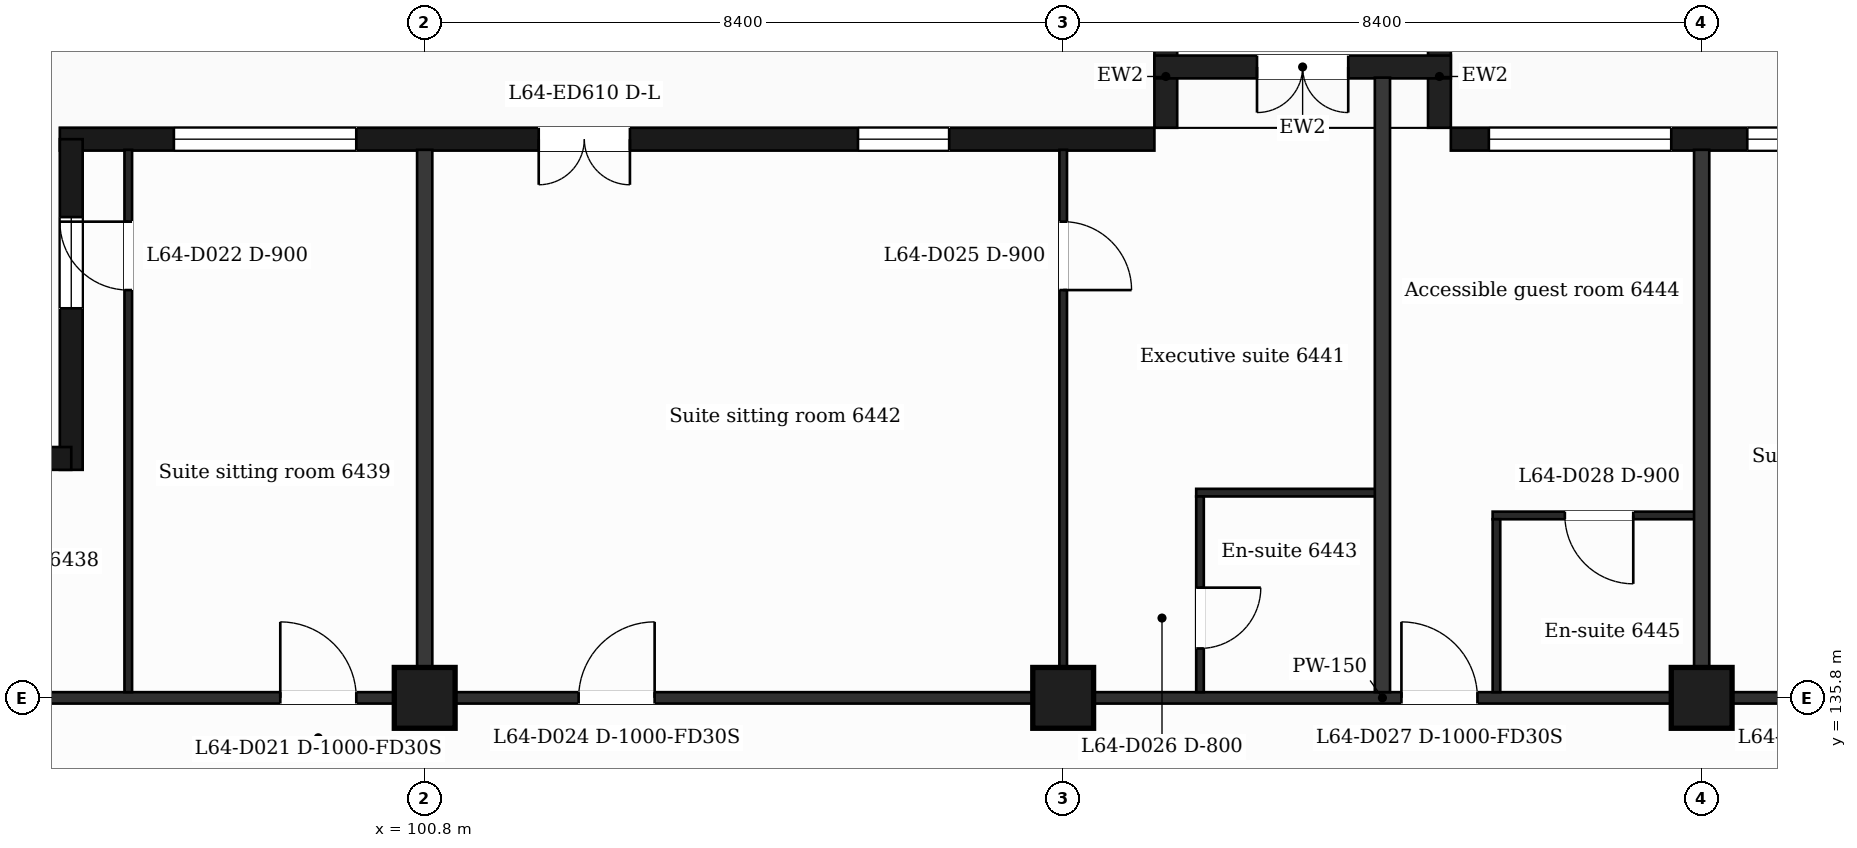
"""IFC4 building model, lengths in metres.
Left out: names, types, materials, properties, quantities, classifications, styles, units other than length and angle.
Written with IfcOpenShell. Run it as: python <this file> out.ifc"""

import sys

from ifc_helpers import new_model, si_unit, direction, frame, frame_2d, origin, origin_2d, place, context, subcontext, project, spatial, rectangle, extrude, element, fill, save


model = new_model("IFC4")
c1 = context("Model", 3, precision=1e-05, world=origin(), true_north=direction((0.0, 1.0)))
c2 = subcontext(c1, "Body", "Model", "MODEL_VIEW")
j1 = project(units=[si_unit("LENGTHUNIT", "METRE"), si_unit("PLANEANGLEUNIT", "RADIAN")], contexts=[c1])
p1 = place(None, origin())
s1 = spatial("IfcSite", under=j1, at=p1, CompositionType="ELEMENT")
p2 = place(p1, origin())
s2 = spatial("IfcBuilding", under=s1, at=p2, CompositionType="ELEMENT")
p3 = place(p2, frame((0.0, 0.0, 266.4)))
s3 = spatial("IfcBuildingStorey", under=s2, at=p3, CompositionType="ELEMENT", Elevation=266.4)
for number, where, z_axis, x_axis in (
    (1, (100.8, 135.8, 0.0), (0.0, 0.0, 1.0), (1.0, 0.0, 0.0)),
    (2, (109.2, 135.8, 0.0), (0.0, 0.0, 1.0), (1.0, 0.0, 0.0)),
    (3, (117.6, 135.8, 0.0), (0.0, 0.0, 1.0), (1.0, 0.0, 0.0)),
):
    element("IfcColumn", number, at=place(p3, frame(where, z_axis=z_axis, x_axis=x_axis)), inside=s3, PredefinedType="COLUMN", context=c2, shape_type="SweptSolid", body=[
        extrude(rectangle(XDim=0.8, YDim=0.8, at=origin_2d()), origin(), (0.0, 0.0, 1.0), 3.7),
    ])
p4 = place(p3, frame((130.65, 143.15, 0.0), z_axis=(0.0, 0.0, 1.0), x_axis=(-1.0, 0.0, 0.0)))
e4 = element("IfcWall", 4, at=p4, inside=s3, PredefinedType="SOLIDWALL", context=c2, shape_type="SweptSolid", body=[
    extrude(rectangle(XDim=16.35, YDim=0.3, at=frame_2d((8.175, 0.0))), origin(), (0.0, 0.0, 1.0), 3.38),
])
p5 = place(p4, frame((1.35, 0.0, 0.9)))
e5 = element("IfcOpeningElement", 5, at=p5, cuts=e4, PredefinedType="OPENING", context=c2, shape_type="SweptSolid", body=[
    extrude(rectangle(XDim=2.4, YDim=2.1, at=frame_2d((1.2, 1.05))), frame((0.0, 0.16, 0.0), z_axis=(0.0, -1.0, 0.0), x_axis=(1.0, 0.0, 0.0)), (0.0, 0.0, 1.0), 0.32),
])
p6 = place(p4, frame((5.55, 0.0, 0.9)))
e6 = element("IfcOpeningElement", 6, at=p6, cuts=e4, PredefinedType="OPENING", context=c2, shape_type="SweptSolid", body=[
    extrude(rectangle(XDim=2.4, YDim=2.1, at=frame_2d((1.2, 1.05))), frame((0.0, 0.16, 0.0), z_axis=(0.0, -1.0, 0.0), x_axis=(1.0, 0.0, 0.0)), (0.0, 0.0, 1.0), 0.32),
])
p7 = place(p4, frame((9.45, 0.0, 0.0)))
e7 = element("IfcOpeningElement", 7, at=p7, cuts=e4, PredefinedType="OPENING", context=c2, shape_type="SweptSolid", body=[
    extrude(rectangle(XDim=1.2, YDim=2.4, at=frame_2d((0.6, 1.2))), frame((0.0, 0.16, 0.0), z_axis=(0.0, -1.0, 0.0), x_axis=(1.0, 0.0, 0.0)), (0.0, 0.0, 1.0), 0.32),
])
p8 = place(p4, frame((11.25, 0.0, 0.9)))
e8 = element("IfcOpeningElement", 8, at=p8, cuts=e4, PredefinedType="OPENING", context=c2, shape_type="SweptSolid", body=[
    extrude(rectangle(XDim=1.2, YDim=2.1, at=frame_2d((0.6, 1.05))), frame((0.0, 0.16, 0.0), z_axis=(0.0, -1.0, 0.0), x_axis=(1.0, 0.0, 0.0)), (0.0, 0.0, 1.0), 0.32),
])
p9 = place(p4, frame((13.45, 0.0, 0.9)))
e9 = element("IfcOpeningElement", 9, at=p9, cuts=e4, PredefinedType="OPENING", context=c2, shape_type="SweptSolid", body=[
    extrude(rectangle(XDim=2.4, YDim=2.1, at=frame_2d((1.2, 1.05))), frame((0.0, 0.16, 0.0), z_axis=(0.0, -1.0, 0.0), x_axis=(1.0, 0.0, 0.0)), (0.0, 0.0, 1.0), 0.32),
])
p10 = place(p3, frame((110.4, 143.15, 0.0), z_axis=(0.0, 0.0, 1.0), x_axis=(-1.0, 0.0, 0.0)))
e10 = element("IfcWall", 10, at=p10, inside=s3, PredefinedType="SOLIDWALL", context=c2, shape_type="SweptSolid", body=[
    extrude(rectangle(XDim=14.4, YDim=0.3, at=frame_2d((7.2, 0.0))), origin(), (0.0, 0.0, 1.0), 3.38),
])
p11 = place(p10, frame((2.7, 0.0, 0.9)))
e11 = element("IfcOpeningElement", 11, at=p11, cuts=e10, PredefinedType="OPENING", context=c2, shape_type="SweptSolid", body=[
    extrude(rectangle(XDim=1.2, YDim=2.1, at=frame_2d((0.6, 1.05))), frame((0.0, 0.16, 0.0), z_axis=(0.0, -1.0, 0.0), x_axis=(1.0, 0.0, 0.0)), (0.0, 0.0, 1.0), 0.32),
])
p12 = place(p10, frame((6.9, 0.0, 0.0)))
e12 = element("IfcOpeningElement", 12, at=p12, cuts=e10, PredefinedType="OPENING", context=c2, shape_type="SweptSolid", body=[
    extrude(rectangle(XDim=1.2, YDim=2.4, at=frame_2d((0.6, 1.2))), frame((0.0, 0.16, 0.0), z_axis=(0.0, -1.0, 0.0), x_axis=(1.0, 0.0, 0.0)), (0.0, 0.0, 1.0), 0.32),
])
p13 = place(p10, frame((10.5, 0.0, 0.9)))
e13 = element("IfcOpeningElement", 13, at=p13, cuts=e10, PredefinedType="OPENING", context=c2, shape_type="SweptSolid", body=[
    extrude(rectangle(XDim=2.4, YDim=2.1, at=frame_2d((1.2, 1.05))), frame((0.0, 0.16, 0.0), z_axis=(0.0, -1.0, 0.0), x_axis=(1.0, 0.0, 0.0)), (0.0, 0.0, 1.0), 0.32),
])
for number, where, z_axis, x_axis in (
    (14, (114.15, 143.3, 0.0), (0.0, 0.0, 1.0), (0.0, 1.0, 0.0)),
    (15, (110.55, 143.3, 0.0), (0.0, 0.0, 1.0), (0.0, 1.0, 0.0)),
):
    element("IfcWall", number, at=place(p3, frame(where, z_axis=z_axis, x_axis=x_axis)), inside=s3, PredefinedType="SOLIDWALL", context=c2, shape_type="SweptSolid", body=[
        extrude(rectangle(XDim=1.35, YDim=0.3, at=frame_2d((0.675, 0.0))), origin(), (0.0, 0.0, 1.0), 3.38),
    ])
p14 = place(p3, frame((114.3, 144.1, 0.0), z_axis=(0.0, 0.0, 1.0), x_axis=(-1.0, 0.0, 0.0)))
e16 = element("IfcWall", 16, at=p14, inside=s3, PredefinedType="SOLIDWALL", context=c2, shape_type="SweptSolid", body=[
    extrude(rectangle(XDim=3.9, YDim=0.3, at=frame_2d((1.95, 0.0))), origin(), (0.0, 0.0, 1.0), 3.38),
])
p15 = place(p14, frame((1.35, 0.0, 0.0)))
e17 = element("IfcOpeningElement", 17, at=p15, cuts=e16, PredefinedType="OPENING", context=c2, shape_type="SweptSolid", body=[
    extrude(rectangle(XDim=1.2, YDim=2.4, at=frame_2d((0.6, 1.2))), frame((0.0, 0.16, 0.0), z_axis=(0.0, -1.0, 0.0), x_axis=(1.0, 0.0, 0.0)), (0.0, 0.0, 1.0), 0.32),
])
p16 = place(p3, frame((96.15, 143.15, 0.0), z_axis=(0.0, 0.0, 1.0), x_axis=(0.0, -1.0, 0.0)))
e18 = element("IfcWall", 18, at=p16, inside=s3, PredefinedType="SOLIDWALL", context=c2, shape_type="SweptSolid", body=[
    extrude(rectangle(XDim=4.35, YDim=0.3, at=frame_2d((2.175, 0.0))), origin(), (0.0, 0.0, 1.0), 3.38),
])
p17 = place(p16, frame((1.025, 0.0, 0.9)))
e19 = element("IfcOpeningElement", 19, at=p17, cuts=e18, PredefinedType="OPENING", context=c2, shape_type="SweptSolid", body=[
    extrude(rectangle(XDim=1.2, YDim=2.1, at=frame_2d((0.6, 1.05))), frame((0.0, 0.16, 0.0), z_axis=(0.0, -1.0, 0.0), x_axis=(1.0, 0.0, 0.0)), (0.0, 0.0, 1.0), 0.32),
])
p18 = place(p3, frame((96.15, 138.95, 0.0), z_axis=(0.0, 0.0, 1.0), x_axis=(-1.0, 0.0, 0.0)))
e20 = element("IfcWall", 20, at=p18, inside=s3, PredefinedType="SOLIDWALL", context=c2, shape_type="SweptSolid", body=[
    extrude(rectangle(XDim=5.104, YDim=0.3, at=frame_2d((2.552, 0.0))), origin(), (0.0, 0.0, 1.0), 3.38),
])
p19 = place(p18, frame((0.725, 0.0, 0.9)))
e21 = element("IfcOpeningElement", 21, at=p19, cuts=e20, PredefinedType="OPENING", context=c2, shape_type="SweptSolid", body=[
    extrude(rectangle(XDim=2.4, YDim=2.1, at=frame_2d((1.2, 1.05))), frame((0.0, 0.16, 0.0), z_axis=(0.0, -1.0, 0.0), x_axis=(1.0, 0.0, 0.0)), (0.0, 0.0, 1.0), 0.32),
])
p20 = place(p3, frame((90.895, 135.8, 0.0), z_axis=(0.0, 0.0, 1.0), x_axis=(1.0, 0.0, 0.0)))
e22 = element("IfcWall", 22, at=p20, inside=s3, PredefinedType="PARTITIONING", context=c2, shape_type="SweptSolid", body=[
    extrude(rectangle(XDim=45.011, YDim=0.15, at=frame_2d((22.505, 0.0))), origin(), (0.0, 0.0, 1.0), 3.38),
])
p21 = place(p20, frame((8.005, 0.0, 0.0)))
e23 = element("IfcOpeningElement", 23, at=p21, cuts=e22, PredefinedType="OPENING", context=c2, shape_type="SweptSolid", body=[
    extrude(rectangle(XDim=1.0, YDim=2.1, at=frame_2d((0.5, 1.05))), frame((0.0, 0.085, 0.0), z_axis=(0.0, -1.0, 0.0), x_axis=(1.0, 0.0, 0.0)), (0.0, 0.0, 1.0), 0.17),
])
p22 = place(p20, frame((11.93, 0.0, 0.0)))
e24 = element("IfcOpeningElement", 24, at=p22, cuts=e22, PredefinedType="OPENING", context=c2, shape_type="SweptSolid", body=[
    extrude(rectangle(XDim=1.0, YDim=2.1, at=frame_2d((0.5, 1.05))), frame((0.0, 0.085, 0.0), z_axis=(0.0, -1.0, 0.0), x_axis=(1.0, 0.0, 0.0)), (0.0, 0.0, 1.0), 0.17),
])
p23 = place(p20, frame((22.755, 0.0, 0.0)))
e25 = element("IfcOpeningElement", 25, at=p23, cuts=e22, PredefinedType="OPENING", context=c2, shape_type="SweptSolid", body=[
    extrude(rectangle(XDim=1.0, YDim=2.1, at=frame_2d((0.5, 1.05))), frame((0.0, 0.085, 0.0), z_axis=(0.0, -1.0, 0.0), x_axis=(1.0, 0.0, 0.0)), (0.0, 0.0, 1.0), 0.17),
])
p24 = place(p20, frame((28.305, 0.0, 0.0)))
e26 = element("IfcOpeningElement", 26, at=p24, cuts=e22, PredefinedType="OPENING", context=c2, shape_type="SweptSolid", body=[
    extrude(rectangle(XDim=1.0, YDim=2.1, at=frame_2d((0.5, 1.05))), frame((0.0, 0.085, 0.0), z_axis=(0.0, -1.0, 0.0), x_axis=(1.0, 0.0, 0.0)), (0.0, 0.0, 1.0), 0.17),
])
p25 = place(p20, frame((37.615, 0.0, 0.0)))
e27 = element("IfcOpeningElement", 27, at=p25, cuts=e22, PredefinedType="OPENING", context=c2, shape_type="SweptSolid", body=[
    extrude(rectangle(XDim=1.0, YDim=2.1, at=frame_2d((0.5, 1.05))), frame((0.0, 0.085, 0.0), z_axis=(0.0, -1.0, 0.0), x_axis=(1.0, 0.0, 0.0)), (0.0, 0.0, 1.0), 0.17),
])
p26 = place(p3, frame((114.85, 138.2, 0.0), z_axis=(0.0, 0.0, 1.0), x_axis=(1.0, 0.0, 0.0)))
e28 = element("IfcWall", 28, at=p26, inside=s3, PredefinedType="PARTITIONING", context=c2, shape_type="SweptSolid", body=[
    extrude(rectangle(XDim=2.75, YDim=0.1, at=frame_2d((1.375, 0.0))), origin(), (0.0, 0.0, 1.0), 3.38),
])
p27 = place(p26, frame((0.95, 0.0, 0.0)))
e29 = element("IfcOpeningElement", 29, at=p27, cuts=e28, PredefinedType="OPENING", context=c2, shape_type="SweptSolid", body=[
    extrude(rectangle(XDim=0.9, YDim=2.1, at=frame_2d((0.45, 1.05))), frame((0.0, 0.06, 0.0), z_axis=(0.0, -1.0, 0.0), x_axis=(1.0, 0.0, 0.0)), (0.0, 0.0, 1.0), 0.12),
])
p28 = place(p3, frame((110.95, 138.5, 0.0), z_axis=(0.0, 0.0, 1.0), x_axis=(1.0, 0.0, 0.0)))
e30 = element("IfcWall", 30, at=p28, inside=s3, PredefinedType="PARTITIONING", context=c2, shape_type="SweptSolid", body=[
    extrude(rectangle(XDim=2.45, YDim=0.1, at=frame_2d((1.225, 0.0))), origin(), (0.0, 0.0, 1.0), 3.38),
])
p29 = place(p3, frame((96.9, 135.875, 0.0), z_axis=(0.0, 0.0, 1.0), x_axis=(0.0, 1.0, 0.0)))
e31 = element("IfcWall", 31, at=p29, inside=s3, PredefinedType="PARTITIONING", context=c2, shape_type="SweptSolid", body=[
    extrude(rectangle(XDim=7.135, YDim=0.1, at=frame_2d((3.567, 0.0))), origin(), (0.0, 0.0, 1.0), 3.38),
])
p30 = place(p29, frame((5.29, 0.0, 0.0)))
e32 = element("IfcOpeningElement", 32, at=p30, cuts=e31, PredefinedType="OPENING", context=c2, shape_type="SweptSolid", body=[
    extrude(rectangle(XDim=0.9, YDim=2.1, at=frame_2d((0.45, 1.05))), frame((0.0, 0.06, 0.0), z_axis=(0.0, -1.0, 0.0), x_axis=(1.0, 0.0, 0.0)), (0.0, 0.0, 1.0), 0.12),
])
p31 = place(p3, frame((100.8, 135.875, 0.0), z_axis=(0.0, 0.0, 1.0), x_axis=(0.0, 1.0, 0.0)))
e33 = element("IfcWall", 33, at=p31, inside=s3, PredefinedType="PARTITIONING", context=c2, shape_type="SweptSolid", body=[
    extrude(rectangle(XDim=7.135, YDim=0.2, at=frame_2d((3.567, 0.0))), origin(), (0.0, 0.0, 1.0), 3.38),
])
p32 = place(p3, frame((109.2, 135.875, 0.0), z_axis=(0.0, 0.0, 1.0), x_axis=(0.0, 1.0, 0.0)))
e34 = element("IfcWall", 34, at=p32, inside=s3, PredefinedType="PARTITIONING", context=c2, shape_type="SweptSolid", body=[
    extrude(rectangle(XDim=7.135, YDim=0.1, at=frame_2d((3.567, 0.0))), origin(), (0.0, 0.0, 1.0), 3.38),
])
p33 = place(p32, frame((5.29, 0.0, 0.0)))
e35 = element("IfcOpeningElement", 35, at=p33, cuts=e34, PredefinedType="OPENING", context=c2, shape_type="SweptSolid", body=[
    extrude(rectangle(XDim=0.9, YDim=2.1, at=frame_2d((0.45, 1.05))), frame((0.0, 0.06, 0.0), z_axis=(0.0, -1.0, 0.0), x_axis=(1.0, 0.0, 0.0)), (0.0, 0.0, 1.0), 0.12),
])
p34 = place(p3, frame((111.0, 135.875, 0.0), z_axis=(0.0, 0.0, 1.0), x_axis=(0.0, 1.0, 0.0)))
e36 = element("IfcWall", 36, at=p34, inside=s3, PredefinedType="PARTITIONING", context=c2, shape_type="SweptSolid", body=[
    extrude(rectangle(XDim=2.575, YDim=0.1, at=frame_2d((1.288, 0.0))), origin(), (0.0, 0.0, 1.0), 3.38),
])
p35 = place(p34, frame((0.575, 0.0, 0.0)))
e37 = element("IfcOpeningElement", 37, at=p35, cuts=e36, PredefinedType="OPENING", context=c2, shape_type="SweptSolid", body=[
    extrude(rectangle(XDim=0.8, YDim=2.1, at=frame_2d((0.4, 1.05))), frame((0.0, 0.06, 0.0), z_axis=(0.0, -1.0, 0.0), x_axis=(1.0, 0.0, 0.0)), (0.0, 0.0, 1.0), 0.12),
])
p36 = place(p3, frame((113.4, 135.875, 0.0), z_axis=(0.0, 0.0, 1.0), x_axis=(0.0, 1.0, 0.0)))
e38 = element("IfcWall", 38, at=p36, inside=s3, PredefinedType="PARTITIONING", context=c2, shape_type="SweptSolid", body=[
    extrude(rectangle(XDim=8.085, YDim=0.2, at=frame_2d((4.042, 0.0))), origin(), (0.0, 0.0, 1.0), 3.38),
])
p37 = place(p3, frame((114.9, 135.875, 0.0), z_axis=(0.0, 0.0, 1.0), x_axis=(0.0, 1.0, 0.0)))
e39 = element("IfcWall", 39, at=p37, inside=s3, PredefinedType="PARTITIONING", context=c2, shape_type="SweptSolid", body=[
    extrude(rectangle(XDim=2.275, YDim=0.1, at=frame_2d((1.137, 0.0))), origin(), (0.0, 0.0, 1.0), 3.38),
])
p38 = place(p3, frame((117.6, 135.875, 0.0), z_axis=(0.0, 0.0, 1.0), x_axis=(0.0, 1.0, 0.0)))
e40 = element("IfcWall", 40, at=p38, inside=s3, PredefinedType="PARTITIONING", context=c2, shape_type="SweptSolid", body=[
    extrude(rectangle(XDim=7.135, YDim=0.2, at=frame_2d((3.567, 0.0))), origin(), (0.0, 0.0, 1.0), 3.38),
])
p39 = place(p8, origin())
e41 = element("IfcWindow", 41, at=p39, inside=s3, PartitioningType="SINGLE_PANEL", PredefinedType="WINDOW", context=c2, shape_type="SweptSolid", body=[
    extrude(rectangle(XDim=1.2, YDim=2.1, at=frame_2d((0.6, 1.05))), frame((0.0, 0.03, 0.0), z_axis=(0.0, -1.0, 0.0), x_axis=(1.0, 0.0, 0.0)), (0.0, 0.0, 1.0), 0.06),
])
fill(e8, e41)
p40 = place(p9, origin())
e42 = element("IfcWindow", 42, at=p40, inside=s3, PartitioningType="SINGLE_PANEL", PredefinedType="WINDOW", context=c2, shape_type="SweptSolid", body=[
    extrude(rectangle(XDim=2.4, YDim=2.1, at=frame_2d((1.2, 1.05))), frame((0.0, 0.03, 0.0), z_axis=(0.0, -1.0, 0.0), x_axis=(1.0, 0.0, 0.0)), (0.0, 0.0, 1.0), 0.06),
])
fill(e9, e42)
p41 = place(p11, origin())
e43 = element("IfcWindow", 43, at=p41, inside=s3, PartitioningType="SINGLE_PANEL", PredefinedType="WINDOW", context=c2, shape_type="SweptSolid", body=[
    extrude(rectangle(XDim=1.2, YDim=2.1, at=frame_2d((0.6, 1.05))), frame((0.0, 0.03, 0.0), z_axis=(0.0, -1.0, 0.0), x_axis=(1.0, 0.0, 0.0)), (0.0, 0.0, 1.0), 0.06),
])
fill(e11, e43)
p42 = place(p12, origin())
e44 = element("IfcDoor", 44, at=p42, inside=s3, OperationType="DOUBLE_DOOR_SINGLE_SWING", PredefinedType="DOOR", context=c2, shape_type="SweptSolid", body=[
    extrude(rectangle(XDim=1.2, YDim=2.4, at=frame_2d((0.6, 1.2))), frame((0.0, 0.025, 0.0), z_axis=(0.0, -1.0, 0.0), x_axis=(1.0, 0.0, 0.0)), (0.0, 0.0, 1.0), 0.05),
])
fill(e12, e44)
p43 = place(p13, origin())
e45 = element("IfcWindow", 45, at=p43, inside=s3, PartitioningType="SINGLE_PANEL", PredefinedType="WINDOW", context=c2, shape_type="SweptSolid", body=[
    extrude(rectangle(XDim=2.4, YDim=2.1, at=frame_2d((1.2, 1.05))), frame((0.0, 0.03, 0.0), z_axis=(0.0, -1.0, 0.0), x_axis=(1.0, 0.0, 0.0)), (0.0, 0.0, 1.0), 0.06),
])
fill(e13, e45)
p44 = place(p15, origin())
e46 = element("IfcDoor", 46, at=p44, inside=s3, OperationType="DOUBLE_DOOR_SINGLE_SWING", PredefinedType="DOOR", context=c2, shape_type="SweptSolid", body=[
    extrude(rectangle(XDim=1.2, YDim=2.4, at=frame_2d((0.6, 1.2))), frame((0.0, 0.025, 0.0), z_axis=(0.0, -1.0, 0.0), x_axis=(1.0, 0.0, 0.0)), (0.0, 0.0, 1.0), 0.05),
])
fill(e17, e46)
p45 = place(p17, origin())
e47 = element("IfcWindow", 47, at=p45, inside=s3, PartitioningType="SINGLE_PANEL", PredefinedType="WINDOW", context=c2, shape_type="SweptSolid", body=[
    extrude(rectangle(XDim=1.2, YDim=2.1, at=frame_2d((0.6, 1.05))), frame((0.0, 0.03, 0.0), z_axis=(0.0, -1.0, 0.0), x_axis=(1.0, 0.0, 0.0)), (0.0, 0.0, 1.0), 0.06),
])
fill(e19, e47)
p46 = place(p21, origin())
e48 = element("IfcDoor", 48, at=p46, inside=s3, OperationType="SINGLE_SWING_LEFT", PredefinedType="DOOR", context=c2, shape_type="SweptSolid", body=[
    extrude(rectangle(XDim=1.0, YDim=2.1, at=frame_2d((0.5, 1.05))), frame((0.0, 0.025, 0.0), z_axis=(0.0, -1.0, 0.0), x_axis=(1.0, 0.0, 0.0)), (0.0, 0.0, 1.0), 0.05),
])
fill(e23, e48)
p47 = place(p30, origin())
e49 = element("IfcDoor", 49, at=p47, inside=s3, OperationType="SINGLE_SWING_RIGHT", PredefinedType="DOOR", context=c2, shape_type="SweptSolid", body=[
    extrude(rectangle(XDim=0.9, YDim=2.1, at=frame_2d((0.45, 1.05))), frame((0.0, 0.025, 0.0), z_axis=(0.0, -1.0, 0.0), x_axis=(1.0, 0.0, 0.0)), (0.0, 0.0, 1.0), 0.05),
])
fill(e32, e49)
p48 = place(p22, origin())
e50 = element("IfcDoor", 50, at=p48, inside=s3, OperationType="SINGLE_SWING_RIGHT", PredefinedType="DOOR", context=c2, shape_type="SweptSolid", body=[
    extrude(rectangle(XDim=1.0, YDim=2.1, at=frame_2d((0.5, 1.05))), frame((0.0, 0.025, 0.0), z_axis=(0.0, -1.0, 0.0), x_axis=(1.0, 0.0, 0.0)), (0.0, 0.0, 1.0), 0.05),
])
fill(e24, e50)
p49 = place(p33, origin())
e51 = element("IfcDoor", 51, at=p49, inside=s3, OperationType="SINGLE_SWING_LEFT", PredefinedType="DOOR", context=c2, shape_type="SweptSolid", body=[
    extrude(rectangle(XDim=0.9, YDim=2.1, at=frame_2d((0.45, 1.05))), frame((0.0, 0.025, 0.0), z_axis=(0.0, -1.0, 0.0), x_axis=(1.0, 0.0, 0.0)), (0.0, 0.0, 1.0), 0.05),
])
fill(e35, e51)
p50 = place(p35, origin())
e52 = element("IfcDoor", 52, at=p50, inside=s3, OperationType="SINGLE_SWING_RIGHT", PredefinedType="DOOR", context=c2, shape_type="SweptSolid", body=[
    extrude(rectangle(XDim=0.8, YDim=2.1, at=frame_2d((0.4, 1.05))), frame((0.0, 0.025, 0.0), z_axis=(0.0, -1.0, 0.0), x_axis=(1.0, 0.0, 0.0)), (0.0, 0.0, 1.0), 0.05),
])
fill(e37, e52)
p51 = place(p23, origin())
e53 = element("IfcDoor", 53, at=p51, inside=s3, OperationType="SINGLE_SWING_LEFT", PredefinedType="DOOR", context=c2, shape_type="SweptSolid", body=[
    extrude(rectangle(XDim=1.0, YDim=2.1, at=frame_2d((0.5, 1.05))), frame((0.0, 0.025, 0.0), z_axis=(0.0, -1.0, 0.0), x_axis=(1.0, 0.0, 0.0)), (0.0, 0.0, 1.0), 0.05),
])
fill(e25, e53)
p52 = place(p27, origin())
e54 = element("IfcDoor", 54, at=p52, inside=s3, OperationType="SINGLE_SWING_RIGHT", PredefinedType="DOOR", context=c2, shape_type="SweptSolid", body=[
    extrude(rectangle(XDim=0.9, YDim=2.1, at=frame_2d((0.45, 1.05))), frame((0.0, 0.025, 0.0), z_axis=(0.0, -1.0, 0.0), x_axis=(1.0, 0.0, 0.0)), (0.0, 0.0, 1.0), 0.05),
])
fill(e29, e54)
save(model, sys.argv[1])
